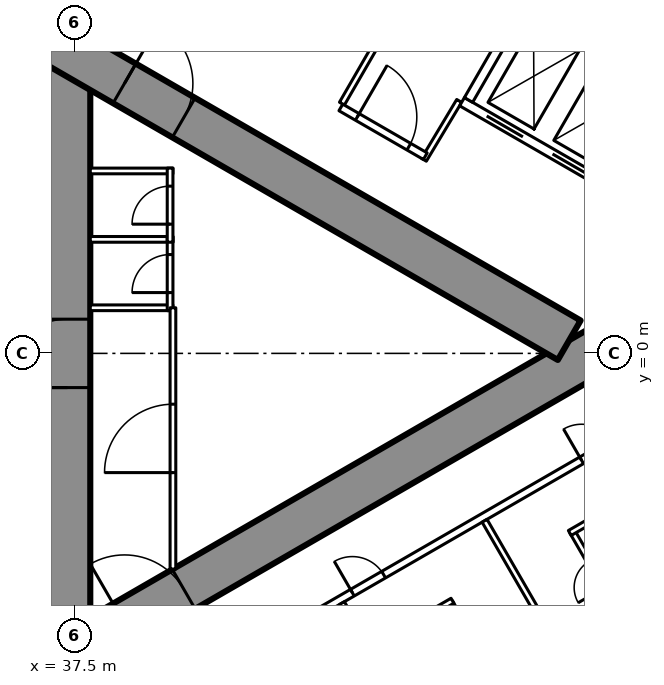
"""IFC4 building model, lengths in metres.
Left out: names, types, materials, properties, quantities, classifications, styles, units other than length and angle.
Written with IfcOpenShell. Run it as: python <this file> out.ifc"""

import sys

from ifc_helpers import new_model, si_unit, direction, frame, frame_2d, origin, place, context, subcontext, project, spatial, rectangle, extrude, element, fill, save


model = new_model("IFC4")
c1 = context("Model", 3, precision=1e-05, world=origin(), true_north=direction((0.0, 1.0)))
c2 = subcontext(c1, "Body", "Model", "MODEL_VIEW")
j1 = project(units=[si_unit("LENGTHUNIT", "METRE"), si_unit("PLANEANGLEUNIT", "RADIAN")], contexts=[c1])
p1 = place(None, origin())
s1 = spatial("IfcSite", under=j1, at=p1, CompositionType="ELEMENT")
p2 = place(p1, origin())
s2 = spatial("IfcBuilding", under=s1, at=p2, CompositionType="ELEMENT")
p3 = place(p2, frame((0.0, 0.0, 191.3)))
s3 = spatial("IfcBuildingStorey", under=s2, at=p3, CompositionType="ELEMENT", Elevation=191.3)
p4 = place(p3, frame((37.3, -8.6, 0.0), z_axis=(0.0, 0.0, 1.0), x_axis=(0.0, 1.0, 0.0)))
e1 = element("IfcWall", 1, at=p4, inside=s3, PredefinedType="SHEAR", context=c2, shape_type="SweptSolid", body=[
    extrude(rectangle(XDim=17.2, YDim=1.2, at=frame_2d((8.6, 0.0))), origin(), (0.0, 0.0, 1.0), 3.5),
])
p5 = place(p4, frame((7.7, 0.0, 0.0)))
e2 = element("IfcOpeningElement", 2, at=p5, cuts=e1, PredefinedType="OPENING", context=c2, shape_type="SweptSolid", body=[
    extrude(rectangle(XDim=1.8, YDim=2.2, at=frame_2d((0.9, 1.1))), frame((0.0, 0.61, 0.0), z_axis=(0.0, -1.0, 0.0), x_axis=(1.0, 0.0, 0.0)), (0.0, 0.0, 1.0), 1.22),
])
p6 = place(p3, frame((27.2, -13.8, 0.0), z_axis=(0.0, 0.0, 1.0), x_axis=(0.866027159892, 0.499996958321, 0.0)))
e3 = element("IfcWall", 3, at=p6, inside=s3, PredefinedType="SHEAR", context=c2, shape_type="SweptSolid", body=[
    extrude(rectangle(XDim=27.947, YDim=1.2, at=frame_2d((13.973, 0.0))), origin(), (0.0, 0.0, 1.0), 3.5),
])
p7 = place(p6, frame((4.6, 0.0, 0.0)))
e4 = element("IfcOpeningElement", 4, at=p7, cuts=e3, PredefinedType="OPENING", context=c2, shape_type="SweptSolid", body=[
    extrude(rectangle(XDim=1.0, YDim=2.2, at=frame_2d((0.5, 1.1))), frame((0.0, 0.61, 0.0), z_axis=(0.0, -1.0, 0.0), x_axis=(1.0, 0.0, 0.0)), (0.0, 0.0, 1.0), 1.22),
])
p8 = place(p6, frame((13.395, 0.0, 0.0)))
e5 = element("IfcOpeningElement", 5, at=p8, cuts=e3, PredefinedType="OPENING", context=c2, shape_type="SweptSolid", body=[
    extrude(rectangle(XDim=1.8, YDim=2.2, at=frame_2d((0.9, 1.1))), frame((0.0, 0.61, 0.0), z_axis=(0.0, -1.0, 0.0), x_axis=(1.0, 0.0, 0.0)), (0.0, 0.0, 1.0), 1.22),
])
p9 = place(p3, frame((27.2, 13.8, 0.0), z_axis=(0.0, 0.0, 1.0), x_axis=(0.866024515034, -0.500001539357, 0.0)))
e6 = element("IfcWall", 6, at=p9, inside=s3, PredefinedType="SHEAR", context=c2, shape_type="SweptSolid", body=[
    extrude(rectangle(XDim=26.907, YDim=1.2, at=frame_2d((13.454, 0.0))), origin(), (0.0, 0.0, 1.0), 3.5),
])
p10 = place(p9, frame((4.6, 0.0, 0.0)))
e7 = element("IfcOpeningElement", 7, at=p10, cuts=e6, PredefinedType="OPENING", context=c2, shape_type="SweptSolid", body=[
    extrude(rectangle(XDim=1.0, YDim=2.2, at=frame_2d((0.5, 1.1))), frame((0.0, 0.61, 0.0), z_axis=(0.0, -1.0, 0.0), x_axis=(1.0, 0.0, 0.0)), (0.0, 0.0, 1.0), 1.22),
])
p11 = place(p9, frame((13.395, 0.0, 0.0)))
e8 = element("IfcOpeningElement", 8, at=p11, cuts=e6, PredefinedType="OPENING", context=c2, shape_type="SweptSolid", body=[
    extrude(rectangle(XDim=1.8, YDim=2.2, at=frame_2d((0.9, 1.1))), frame((0.0, 0.61, 0.0), z_axis=(0.0, -1.0, 0.0), x_axis=(1.0, 0.0, 0.0)), (0.0, 0.0, 1.0), 1.22),
])
p12 = place(p3, frame((27.959, -16.017, 0.0), z_axis=(0.0, 0.0, 1.0), x_axis=(0.866024151371, 0.500002169237, 0.0)))
e9 = element("IfcWall", 9, at=p12, inside=s3, PredefinedType="PARTITIONING", context=c2, shape_type="SweptSolid", body=[
    extrude(rectangle(XDim=32.034, YDim=0.2, at=frame_2d((16.017, 0.0))), origin(), (0.0, 0.0, 1.0), 3.25),
])
p13 = place(p12, frame((0.6, 0.0, 0.0)))
e10 = element("IfcOpeningElement", 10, at=p13, cuts=e9, PredefinedType="OPENING", context=c2, shape_type="SweptSolid", body=[
    extrude(rectangle(XDim=0.95, YDim=2.2, at=frame_2d((0.475, 1.1))), frame((0.0, 0.11, 0.0), z_axis=(0.0, -1.0, 0.0), x_axis=(1.0, 0.0, 0.0)), (0.0, 0.0, 1.0), 0.22),
])
p14 = place(p12, frame((13.132, 0.0, 0.0)))
e11 = element("IfcOpeningElement", 11, at=p14, cuts=e9, PredefinedType="OPENING", context=c2, shape_type="SweptSolid", body=[
    extrude(rectangle(XDim=0.95, YDim=2.2, at=frame_2d((0.475, 1.1))), frame((0.0, 0.11, 0.0), z_axis=(0.0, -1.0, 0.0), x_axis=(1.0, 0.0, 0.0)), (0.0, 0.0, 1.0), 0.22),
])
p15 = place(p12, frame((15.391, 0.0, 0.0)))
e12 = element("IfcOpeningElement", 12, at=p15, cuts=e9, PredefinedType="OPENING", context=c2, shape_type="SweptSolid", body=[
    extrude(rectangle(XDim=0.95, YDim=2.2, at=frame_2d((0.475, 1.1))), frame((0.0, 0.11, 0.0), z_axis=(0.0, -1.0, 0.0), x_axis=(1.0, 0.0, 0.0)), (0.0, 0.0, 1.0), 0.22),
])
p16 = place(p12, frame((19.441, 0.0, 0.0)))
e13 = element("IfcOpeningElement", 13, at=p16, cuts=e9, PredefinedType="OPENING", context=c2, shape_type="SweptSolid", body=[
    extrude(rectangle(XDim=0.95, YDim=2.2, at=frame_2d((0.475, 1.1))), frame((0.0, 0.11, 0.0), z_axis=(0.0, -1.0, 0.0), x_axis=(1.0, 0.0, 0.0)), (0.0, 0.0, 1.0), 0.22),
])
p17 = place(p12, frame((26.406, 0.0, 0.0)))
e14 = element("IfcOpeningElement", 14, at=p17, cuts=e9, PredefinedType="OPENING", context=c2, shape_type="SweptSolid", body=[
    extrude(rectangle(XDim=0.95, YDim=2.2, at=frame_2d((0.475, 1.1))), frame((0.0, 0.11, 0.0), z_axis=(0.0, -1.0, 0.0), x_axis=(1.0, 0.0, 0.0)), (0.0, 0.0, 1.0), 0.22),
])
p18 = place(p12, frame((28.87, 0.0, 0.0)))
e15 = element("IfcOpeningElement", 15, at=p18, cuts=e9, PredefinedType="OPENING", context=c2, shape_type="SweptSolid", body=[
    extrude(rectangle(XDim=1.8, YDim=2.2, at=frame_2d((0.9, 1.1))), frame((0.0, 0.11, 0.0), z_axis=(0.0, -1.0, 0.0), x_axis=(1.0, 0.0, 0.0)), (0.0, 0.0, 1.0), 0.22),
])
p19 = place(p3, frame((44.521, -6.571, 0.0), z_axis=(0.0, 0.0, 1.0), x_axis=(0.500010457486, -0.866019366068, 0.0)))
e16 = element("IfcWall", 16, at=p19, inside=s3, PredefinedType="PARTITIONING", context=c2, shape_type="SweptSolid", body=[
    extrude(rectangle(XDim=10.126, YDim=0.15, at=frame_2d((5.063, 0.0))), origin(), (0.0, 0.0, 1.0), 3.25),
])
p20 = place(p3, frame((48.275, -4.404, 0.0), z_axis=(0.0, 0.0, 1.0), x_axis=(0.500006004368, -0.866021937133, 0.0)))
e17 = element("IfcWall", 17, at=p20, inside=s3, PredefinedType="PARTITIONING", context=c2, shape_type="SweptSolid", body=[
    extrude(rectangle(XDim=7.279, YDim=0.15, at=frame_2d((3.64, 0.0))), origin(), (0.0, 0.0, 1.0), 2.3),
])
p21 = place(p3, frame((44.521, 6.571, 0.0), z_axis=(0.0, 0.0, 1.0), x_axis=(0.500020376429, 0.866013639128, 0.0)))
e18 = element("IfcWall", 18, at=p21, inside=s3, PredefinedType="PARTITIONING", context=c2, shape_type="SweptSolid", body=[
    extrude(rectangle(XDim=7.306, YDim=0.15, at=frame_2d((3.653, 0.0))), origin(), (0.0, 0.0, 1.0), 2.3),
])
p22 = place(p3, frame((47.606, 6.643, 0.0), z_axis=(0.0, 0.0, 1.0), x_axis=(-0.514237157483, -0.857648031458, 0.0)))
e19 = element("IfcWall", 19, at=p22, inside=s3, PredefinedType="PARTITIONING", context=c2, shape_type="SweptSolid", body=[
    extrude(rectangle(XDim=1.805, YDim=0.15, at=frame_2d((0.902, 0.0))), origin(), (0.0, 0.0, 1.0), 3.25),
])
p23 = place(p3, frame((44.493, 6.472, 0.0), z_axis=(0.0, 0.0, 1.0), x_axis=(0.866027140358, -0.499996992154, 0.0)))
e20 = element("IfcWall", 20, at=p23, inside=s3, PredefinedType="PARTITIONING", context=c2, shape_type="SweptSolid", body=[
    extrude(rectangle(XDim=2.566, YDim=0.2, at=frame_2d((1.283, 0.0))), origin(), (0.0, 0.0, 1.0), 3.25),
])
p24 = place(p23, frame((0.5, 0.0, 0.0)))
e21 = element("IfcOpeningElement", 21, at=p24, cuts=e20, PredefinedType="OPENING", context=c2, shape_type="SweptSolid", body=[
    extrude(rectangle(XDim=1.566, YDim=2.2, at=frame_2d((0.783, 1.1))), frame((0.0, 0.11, 0.0), z_axis=(0.0, -1.0, 0.0), x_axis=(1.0, 0.0, 0.0)), (0.0, 0.0, 1.0), 0.22),
])
p25 = place(p3, frame((47.365, -6.546, 0.0), z_axis=(0.0, 0.0, 1.0), x_axis=(0.500006934395, -0.866021400173, 0.0)))
e22 = element("IfcWall", 22, at=p25, inside=s3, PredefinedType="PARTITIONING", context=c2, shape_type="SweptSolid", body=[
    extrude(rectangle(XDim=2.6, YDim=0.15, at=frame_2d((1.3, 0.0))), origin(), (0.0, 0.0, 1.0), 3.25),
])
p26 = place(p25, frame((0.9, 0.0, 0.0)))
e23 = element("IfcOpeningElement", 23, at=p26, cuts=e22, PredefinedType="OPENING", context=c2, shape_type="SweptSolid", body=[
    extrude(rectangle(XDim=0.8, YDim=2.2, at=frame_2d((0.4, 1.1))), frame((0.0, 0.085, 0.0), z_axis=(0.0, -1.0, 0.0), x_axis=(1.0, 0.0, 0.0)), (0.0, 0.0, 1.0), 0.17),
])
p27 = place(p3, frame((45.286, -7.746, 0.0), z_axis=(0.0, 0.0, 1.0), x_axis=(0.866006523861, 0.500032699561, 0.0)))
e24 = element("IfcWall", 24, at=p27, inside=s3, PredefinedType="PARTITIONING", context=c2, shape_type="SweptSolid", body=[
    extrude(rectangle(XDim=2.475, YDim=0.15, at=frame_2d((1.237, 0.0))), origin(), (0.0, 0.0, 1.0), 3.25),
])
p28 = place(p3, frame((50.582, -4.688, 0.0), z_axis=(0.0, 0.0, 1.0), x_axis=(0.500006934395, -0.866021400173, 0.0)))
e25 = element("IfcWall", 25, at=p28, inside=s3, PredefinedType="PARTITIONING", context=c2, shape_type="SweptSolid", body=[
    extrude(rectangle(XDim=2.6, YDim=0.15, at=frame_2d((1.3, 0.0))), origin(), (0.0, 0.0, 1.0), 3.25),
])
p29 = place(p28, frame((0.9, 0.0, 0.0)))
e26 = element("IfcOpeningElement", 26, at=p29, cuts=e25, PredefinedType="OPENING", context=c2, shape_type="SweptSolid", body=[
    extrude(rectangle(XDim=0.8, YDim=2.2, at=frame_2d((0.4, 1.1))), frame((0.0, 0.085, 0.0), z_axis=(0.0, -1.0, 0.0), x_axis=(1.0, 0.0, 0.0)), (0.0, 0.0, 1.0), 0.17),
])
p30 = place(p3, frame((50.517, -4.726, 0.0), z_axis=(0.0, 0.0, 1.0), x_axis=(0.866031185235, 0.4999899861, 0.0)))
e27 = element("IfcWall", 27, at=p30, inside=s3, PredefinedType="PARTITIONING", context=c2, shape_type="SweptSolid", body=[
    extrude(rectangle(XDim=2.475, YDim=0.15, at=frame_2d((1.238, 0.0))), origin(), (0.0, 0.0, 1.0), 3.25),
])
for number, where, z_axis, x_axis in (
    (28, (37.9, 1.2, 0.0), (0.0, 0.0, 1.0), (1.0, 0.0, 0.0)),
    (29, (37.9, 3.0, 0.0), (0.0, 0.0, 1.0), (1.0, 0.0, 0.0)),
    (30, (37.9, 4.8, 0.0), (0.0, 0.0, 1.0), (1.0, 0.0, 0.0)),
):
    element("IfcWall", number, at=place(p3, frame(where, z_axis=z_axis, x_axis=x_axis)), inside=s3, PredefinedType="PARTITIONING", context=c2, shape_type="SweptSolid", body=[
        extrude(rectangle(XDim=2.175, YDim=0.15, at=frame_2d((1.087, 0.0))), origin(), (0.0, 0.0, 1.0), 3.25),
    ])
p31 = place(p3, frame((40.0, 1.125, 0.0), z_axis=(0.0, 0.0, 1.0), x_axis=(0.0, 1.0, 0.0)))
e31 = element("IfcWall", 31, at=p31, inside=s3, PredefinedType="PARTITIONING", context=c2, shape_type="SweptSolid", body=[
    extrude(rectangle(XDim=1.95, YDim=0.15, at=frame_2d((0.975, 0.0))), origin(), (0.0, 0.0, 1.0), 3.25),
])
p32 = place(p31, frame((0.475, 0.0, 0.0)))
e32 = element("IfcOpeningElement", 32, at=p32, cuts=e31, PredefinedType="OPENING", context=c2, shape_type="SweptSolid", body=[
    extrude(rectangle(XDim=1.0, YDim=2.2, at=frame_2d((0.5, 1.1))), frame((0.0, 0.085, 0.0), z_axis=(0.0, -1.0, 0.0), x_axis=(1.0, 0.0, 0.0)), (0.0, 0.0, 1.0), 0.17),
])
p33 = place(p3, frame((40.0, 2.925, 0.0), z_axis=(0.0, 0.0, 1.0), x_axis=(0.0, 1.0, 0.0)))
e33 = element("IfcWall", 33, at=p33, inside=s3, PredefinedType="PARTITIONING", context=c2, shape_type="SweptSolid", body=[
    extrude(rectangle(XDim=1.95, YDim=0.15, at=frame_2d((0.975, 0.0))), origin(), (0.0, 0.0, 1.0), 3.25),
])
p34 = place(p33, frame((0.475, 0.0, 0.0)))
e34 = element("IfcOpeningElement", 34, at=p34, cuts=e33, PredefinedType="OPENING", context=c2, shape_type="SweptSolid", body=[
    extrude(rectangle(XDim=1.0, YDim=2.2, at=frame_2d((0.5, 1.1))), frame((0.0, 0.085, 0.0), z_axis=(0.0, -1.0, 0.0), x_axis=(1.0, 0.0, 0.0)), (0.0, 0.0, 1.0), 0.17),
])
p35 = place(p3, frame((40.075, -5.674, 0.0), z_axis=(0.0, 0.0, 1.0), x_axis=(0.0, 1.0, 0.0)))
e35 = element("IfcWall", 35, at=p35, inside=s3, PredefinedType="PARTITIONING", context=c2, shape_type="SweptSolid", body=[
    extrude(rectangle(XDim=6.874, YDim=0.15, at=frame_2d((3.437, 0.0))), origin(), (0.0, 0.0, 1.0), 3.25),
])
p36 = place(p35, frame((2.537, 0.0, 0.0)))
e36 = element("IfcOpeningElement", 36, at=p36, cuts=e35, PredefinedType="OPENING", context=c2, shape_type="SweptSolid", body=[
    extrude(rectangle(XDim=1.8, YDim=2.2, at=frame_2d((0.9, 1.1))), frame((0.0, 0.085, 0.0), z_axis=(0.0, -1.0, 0.0), x_axis=(1.0, 0.0, 0.0)), (0.0, 0.0, 1.0), 0.17),
])
p37 = place(p3, frame((47.681, 6.622, 0.0), z_axis=(0.0, 0.0, 1.0), x_axis=(0.86603344179, -0.499986077507, 0.0)))
e37 = element("IfcWall", 37, at=p37, inside=s3, PredefinedType="PARTITIONING", context=c2, shape_type="SweptSolid", body=[
    extrude(rectangle(XDim=6.6, YDim=0.25, at=frame_2d((3.3, 0.0))), origin(), (0.0, 0.0, 1.0), 3.25),
])
p38 = place(p37, frame((0.75, 0.0, 0.0)))
e38 = element("IfcOpeningElement", 38, at=p38, cuts=e37, PredefinedType="OPENING", context=c2, shape_type="SweptSolid", body=[
    extrude(rectangle(XDim=1.1, YDim=2.2, at=frame_2d((0.55, 1.1))), frame((0.0, 0.135, 0.0), z_axis=(0.0, -1.0, 0.0), x_axis=(1.0, 0.0, 0.0)), (0.0, 0.0, 1.0), 0.27),
])
p39 = place(p37, frame((2.75, 0.0, 0.0)))
e39 = element("IfcOpeningElement", 39, at=p39, cuts=e37, PredefinedType="OPENING", context=c2, shape_type="SweptSolid", body=[
    extrude(rectangle(XDim=1.1, YDim=2.2, at=frame_2d((0.55, 1.1))), frame((0.0, 0.135, 0.0), z_axis=(0.0, -1.0, 0.0), x_axis=(1.0, 0.0, 0.0)), (0.0, 0.0, 1.0), 0.27),
])
p40 = place(p37, frame((4.75, 0.0, 0.0)))
e40 = element("IfcOpeningElement", 40, at=p40, cuts=e37, PredefinedType="OPENING", context=c2, shape_type="SweptSolid", body=[
    extrude(rectangle(XDim=1.1, YDim=2.2, at=frame_2d((0.55, 1.1))), frame((0.0, 0.135, 0.0), z_axis=(0.0, -1.0, 0.0), x_axis=(1.0, 0.0, 0.0)), (0.0, 0.0, 1.0), 0.27),
])
p41 = place(p3, frame((49.406, 9.611, 0.0), z_axis=(0.0, 0.0, 1.0), x_axis=(0.86603344179, -0.499986077507, 0.0)))
e41 = element("IfcWall", 41, at=p41, inside=s3, PredefinedType="PARTITIONING", context=c2, shape_type="SweptSolid", body=[
    extrude(rectangle(XDim=6.6, YDim=0.25, at=frame_2d((3.3, 0.0))), origin(), (0.0, 0.0, 1.0), 3.25),
])
p42 = place(p3, frame((47.852, 6.668, 0.0), z_axis=(0.0, 0.0, 1.0), x_axis=(0.499929347863, 0.866066190972, 0.0)))
e42 = element("IfcWall", 42, at=p42, inside=s3, PredefinedType="PARTITIONING", context=c2, shape_type="SweptSolid", body=[
    extrude(rectangle(XDim=3.201, YDim=0.25, at=frame_2d((1.6, 0.0))), origin(), (0.0, 0.0, 1.0), 3.25),
])
p43 = place(p16, origin())
e43 = element("IfcDoor", 43, at=p43, inside=s3, OperationType="SINGLE_SWING_LEFT", PredefinedType="DOOR", context=c2, shape_type="SweptSolid", body=[
    extrude(rectangle(XDim=0.95, YDim=2.2, at=frame_2d((0.475, 1.1))), frame((0.0, 0.025, 0.0), z_axis=(0.0, -1.0, 0.0), x_axis=(1.0, 0.0, 0.0)), (0.0, 0.0, 1.0), 0.05),
])
fill(e13, e43)
p44 = place(p17, origin())
e44 = element("IfcDoor", 44, at=p44, inside=s3, OperationType="SINGLE_SWING_LEFT", PredefinedType="DOOR", context=c2, shape_type="SweptSolid", body=[
    extrude(rectangle(XDim=0.95, YDim=2.2, at=frame_2d((0.475, 1.1))), frame((0.0, 0.025, 0.0), z_axis=(0.0, -1.0, 0.0), x_axis=(1.0, 0.0, 0.0)), (0.0, 0.0, 1.0), 0.05),
])
fill(e14, e44)
p45 = place(p24, origin())
e45 = element("IfcDoor", 45, at=p45, inside=s3, OperationType="SINGLE_SWING_LEFT", PredefinedType="DOOR", context=c2, shape_type="SweptSolid", body=[
    extrude(rectangle(XDim=1.566, YDim=2.2, at=frame_2d((0.783, 1.1))), frame((0.0, 0.025, 0.0), z_axis=(0.0, -1.0, 0.0), x_axis=(1.0, 0.0, 0.0)), (0.0, 0.0, 1.0), 0.05),
])
fill(e21, e45)
p46 = place(p32, origin())
e46 = element("IfcDoor", 46, at=p46, inside=s3, OperationType="SINGLE_SWING_LEFT", PredefinedType="DOOR", context=c2, shape_type="SweptSolid", body=[
    extrude(rectangle(XDim=1.0, YDim=2.2, at=frame_2d((0.5, 1.1))), frame((0.0, 0.025, 0.0), z_axis=(0.0, -1.0, 0.0), x_axis=(1.0, 0.0, 0.0)), (0.0, 0.0, 1.0), 0.05),
])
fill(e32, e46)
p47 = place(p34, origin())
e47 = element("IfcDoor", 47, at=p47, inside=s3, OperationType="SINGLE_SWING_LEFT", PredefinedType="DOOR", context=c2, shape_type="SweptSolid", body=[
    extrude(rectangle(XDim=1.0, YDim=2.2, at=frame_2d((0.5, 1.1))), frame((0.0, 0.025, 0.0), z_axis=(0.0, -1.0, 0.0), x_axis=(1.0, 0.0, 0.0)), (0.0, 0.0, 1.0), 0.05),
])
fill(e34, e47)
p48 = place(p36, origin())
e48 = element("IfcDoor", 48, at=p48, inside=s3, OperationType="DOUBLE_DOOR_SINGLE_SWING", PredefinedType="DOOR", context=c2, shape_type="SweptSolid", body=[
    extrude(rectangle(XDim=1.8, YDim=2.2, at=frame_2d((0.9, 1.1))), frame((0.0, 0.025, 0.0), z_axis=(0.0, -1.0, 0.0), x_axis=(1.0, 0.0, 0.0)), (0.0, 0.0, 1.0), 0.05),
])
fill(e36, e48)
p49 = place(p8, origin())
e49 = element("IfcDoor", 49, at=p49, inside=s3, OperationType="DOUBLE_DOOR_SINGLE_SWING", PredefinedType="DOOR", context=c2, shape_type="SweptSolid", body=[
    extrude(rectangle(XDim=1.8, YDim=2.2, at=frame_2d((0.9, 1.1))), frame((0.0, 0.025, 0.0), z_axis=(0.0, -1.0, 0.0), x_axis=(1.0, 0.0, 0.0)), (0.0, 0.0, 1.0), 0.05),
])
fill(e5, e49)
p50 = place(p11, origin())
e50 = element("IfcDoor", 50, at=p50, inside=s3, OperationType="DOUBLE_DOOR_SINGLE_SWING", PredefinedType="DOOR", context=c2, shape_type="SweptSolid", body=[
    extrude(rectangle(XDim=1.8, YDim=2.2, at=frame_2d((0.9, 1.1))), frame((0.0, 0.025, 0.0), z_axis=(0.0, -1.0, 0.0), x_axis=(1.0, 0.0, 0.0)), (0.0, 0.0, 1.0), 0.05),
])
fill(e8, e50)
p51 = place(p5, origin())
e51 = element("IfcDoor", 51, at=p51, inside=s3, OperationType="DOUBLE_DOOR_SINGLE_SWING", PredefinedType="DOOR", context=c2, shape_type="SweptSolid", body=[
    extrude(rectangle(XDim=1.8, YDim=2.2, at=frame_2d((0.9, 1.1))), frame((0.0, 0.025, 0.0), z_axis=(0.0, -1.0, 0.0), x_axis=(1.0, 0.0, 0.0)), (0.0, 0.0, 1.0), 0.05),
])
fill(e2, e51)
p52 = place(p38, origin())
e52 = element("IfcDoor", 52, at=p52, inside=s3, OperationType="DOUBLE_DOOR_SLIDING", PredefinedType="USERDEFINED", context=c2, shape_type="SweptSolid", body=[
    extrude(rectangle(XDim=1.1, YDim=2.2, at=frame_2d((0.55, 1.1))), frame((0.0, 0.025, 0.0), z_axis=(0.0, -1.0, 0.0), x_axis=(1.0, 0.0, 0.0)), (0.0, 0.0, 1.0), 0.05),
])
fill(e38, e52)
p53 = place(p39, origin())
e53 = element("IfcDoor", 53, at=p53, inside=s3, OperationType="DOUBLE_DOOR_SLIDING", PredefinedType="USERDEFINED", context=c2, shape_type="SweptSolid", body=[
    extrude(rectangle(XDim=1.1, YDim=2.2, at=frame_2d((0.55, 1.1))), frame((0.0, 0.025, 0.0), z_axis=(0.0, -1.0, 0.0), x_axis=(1.0, 0.0, 0.0)), (0.0, 0.0, 1.0), 0.05),
])
fill(e39, e53)
save(model, sys.argv[1])
